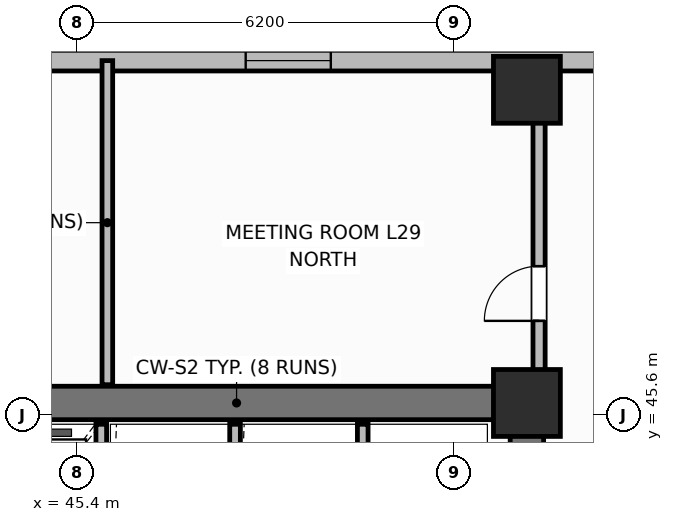
"""IFC4 building model, lengths in metres.
Left out: names, types, materials, properties, quantities, classifications, styles, units other than length and angle.
Written with IfcOpenShell. Run it as: python <this file> out.ifc"""

import sys

from ifc_helpers import new_model, si_unit, direction, frame, frame_2d, origin, origin_2d, place, context, subcontext, project, spatial, rectangle, extrude, element, fill, save


model = new_model("IFC4")
c1 = context("Model", 3, precision=1e-05, world=origin(), true_north=direction((0.0, 1.0)))
c2 = subcontext(c1, "Body", "Model", "MODEL_VIEW")
j1 = project(units=[si_unit("LENGTHUNIT", "METRE"), si_unit("PLANEANGLEUNIT", "RADIAN")], contexts=[c1])
p1 = place(None, origin())
s1 = spatial("IfcSite", under=j1, at=p1, CompositionType="ELEMENT")
p2 = place(p1, origin())
s2 = spatial("IfcBuilding", under=s1, at=p2, CompositionType="ELEMENT")
p3 = place(p2, frame((0.0, 0.0, 117.9)))
s3 = spatial("IfcBuildingStorey", under=s2, at=p3, CompositionType="ELEMENT", Elevation=117.9)
p4 = place(p3, frame((25.6, 45.8, 0.0), z_axis=(0.0, 0.0, 1.0), x_axis=(1.0, 0.0, 0.0)))
e1 = element("IfcWall", 1, at=p4, inside=s3, PredefinedType="SHEAR", context=c2, shape_type="SweptSolid", body=[
    extrude(rectangle(XDim=27.2, YDim=0.55, at=frame_2d((13.6, 0.0))), origin(), (0.0, 0.0, 1.0), 3.7),
])
p5 = place(p3, frame((52.8, 39.875, 0.0), z_axis=(0.0, 0.0, 1.0), x_axis=(0.0, 1.0, 0.0)))
e2 = element("IfcWall", 2, at=p5, inside=s3, PredefinedType="SHEAR", context=c2, shape_type="SweptSolid", body=[
    extrude(rectangle(XDim=5.65, YDim=0.55, at=frame_2d((2.825, 0.0))), origin(), (0.0, 0.0, 1.0), 3.7),
])
for number, where, z_axis, x_axis in (
    (3, (52.8, 45.8, 0.0), (0.0, 0.0, 1.0), (1.0, 0.0, 0.0)),
    (4, (52.8, 50.95, 0.0), (0.0, 0.0, 1.0), (1.0, 0.0, 0.0)),
):
    element("IfcColumn", number, at=place(p3, frame(where, z_axis=z_axis, x_axis=x_axis)), inside=s3, PredefinedType="COLUMN", context=c2, shape_type="SweptSolid", body=[
        extrude(rectangle(XDim=1.1, YDim=1.1, at=origin_2d()), origin(), (0.0, 0.0, 1.0), 3.7),
    ])
p6 = place(p3, frame((55.35, 51.43, 0.0), z_axis=(0.0, 0.0, 1.0), x_axis=(-1.0, 0.0, 0.0)))
e5 = element("IfcWall", 5, at=p6, inside=s3, PredefinedType="SOLIDWALL", context=c2, shape_type="SweptSolid", body=[
    extrude(rectangle(XDim=12.95, YDim=0.34, at=frame_2d((6.475, 0.0))), origin(), (0.0, 0.0, 1.0), 2.7),
])
p7 = place(p6, frame((5.775, 0.0, 0.73)))
e6 = element("IfcOpeningElement", 6, at=p7, cuts=e5, PredefinedType="OPENING", context=c2, shape_type="SweptSolid", body=[
    extrude(rectangle(XDim=1.4, YDim=1.85, at=frame_2d((0.7, 0.925))), frame((0.0, 0.18, 0.0), z_axis=(0.0, -1.0, 0.0), x_axis=(1.0, 0.0, 0.0)), (0.0, 0.0, 1.0), 0.36),
])
for number, where, z_axis, x_axis in (
    (7, (45.8, 42.65, 0.0), (0.0, 0.0, 1.0), (0.0, 1.0, 0.0)),
    (8, (48.0, 42.65, 0.0), (0.0, 0.0, 1.0), (0.0, 1.0, 0.0)),
    (9, (50.1, 42.65, 0.0), (0.0, 0.0, 1.0), (0.0, 1.0, 0.0)),
):
    element("IfcWall", number, at=place(p3, frame(where, z_axis=z_axis, x_axis=x_axis)), inside=s3, PredefinedType="PARTITIONING", context=c2, shape_type="SweptSolid", body=[
        extrude(rectangle(XDim=2.8, YDim=0.175, at=frame_2d((1.4, 0.0))), origin(), (0.0, 0.0, 1.0), 2.53),
    ])
p8 = place(p3, frame((45.9, 46.1, 0.0), z_axis=(0.0, 0.0, 1.0), x_axis=(0.0, 1.0, 0.0)))
e10 = element("IfcWall", 10, at=p8, inside=s3, PredefinedType="PARTITIONING", context=c2, shape_type="SweptSolid", body=[
    extrude(rectangle(XDim=5.33, YDim=0.175, at=frame_2d((2.665, 0.0))), origin(), (0.0, 0.0, 1.0), 2.53),
])
p9 = place(p3, frame((53.0, 46.1, 0.0), z_axis=(0.0, 0.0, 1.0), x_axis=(0.0, 1.0, 0.0)))
e11 = element("IfcWall", 11, at=p9, inside=s3, PredefinedType="PARTITIONING", context=c2, shape_type="SweptSolid", body=[
    extrude(rectangle(XDim=4.53, YDim=0.2, at=frame_2d((2.265, 0.0))), origin(), (0.0, 0.0, 1.0), 2.53),
])
p10 = place(p9, frame((1.05, 0.0, 0.0)))
e12 = element("IfcOpeningElement", 12, at=p10, cuts=e11, PredefinedType="OPENING", context=c2, shape_type="SweptSolid", body=[
    extrude(rectangle(XDim=0.9, YDim=2.1, at=frame_2d((0.45, 1.05))), frame((0.0, 0.11, 0.0), z_axis=(0.0, -1.0, 0.0), x_axis=(1.0, 0.0, 0.0)), (0.0, 0.0, 1.0), 0.22),
])
p11 = place(p7, origin())
e13 = element("IfcWindow", 13, at=p11, inside=s3, PartitioningType="SINGLE_PANEL", PredefinedType="WINDOW", context=c2, shape_type="SweptSolid", body=[
    extrude(rectangle(XDim=1.4, YDim=1.85, at=frame_2d((0.7, 0.925))), frame((0.0, 0.03, 0.0), z_axis=(0.0, -1.0, 0.0), x_axis=(1.0, 0.0, 0.0)), (0.0, 0.0, 1.0), 0.06),
])
fill(e6, e13)
p12 = place(p10, origin())
e14 = element("IfcDoor", 14, at=p12, inside=s3, OperationType="SINGLE_SWING_LEFT", PredefinedType="DOOR", context=c2, shape_type="SweptSolid", body=[
    extrude(rectangle(XDim=0.9, YDim=2.1, at=frame_2d((0.45, 1.05))), frame((0.0, 0.025, 0.0), z_axis=(0.0, -1.0, 0.0), x_axis=(1.0, 0.0, 0.0)), (0.0, 0.0, 1.0), 0.05),
])
fill(e12, e14)
save(model, sys.argv[1])
